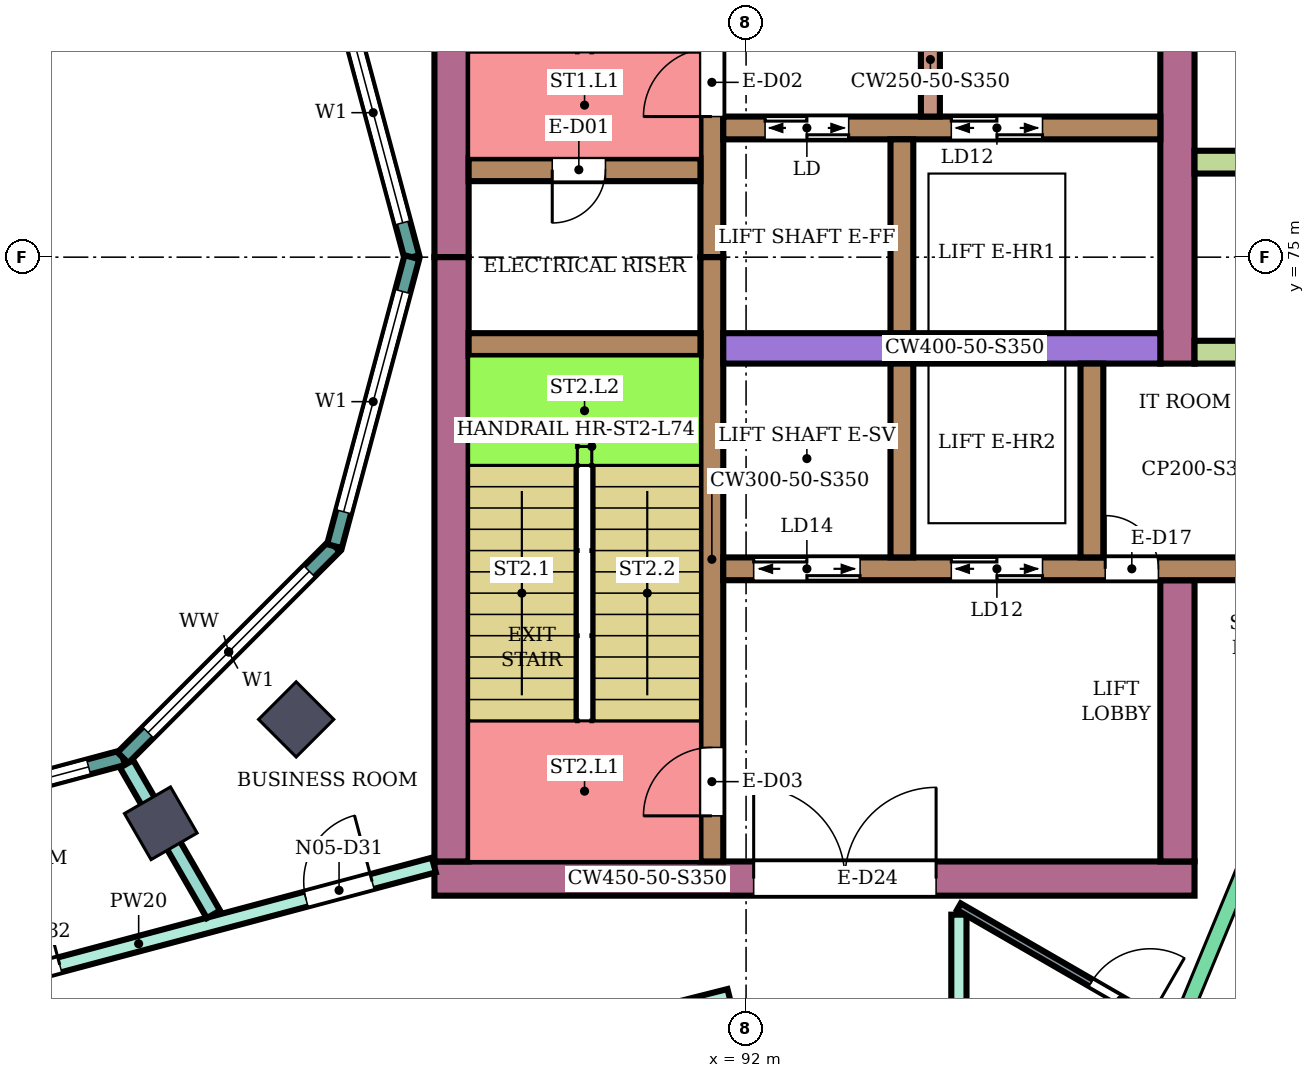
"""IFC4 building model, lengths in metres.
Left out: names, types, materials, properties, quantities, classifications, styles, units other than length and angle.
Written with IfcOpenShell. Run it as: python <this file> out.ifc"""

import sys

from ifc_helpers import new_model, si_unit, direction, frame, frame_2d, origin, origin_2d, place, context, subcontext, project, spatial, rectangle, extrude, element, fill, save


model = new_model("IFC4")
c1 = context("Model", 3, precision=1e-05, world=origin(), true_north=direction((0.0, 1.0)))
c2 = subcontext(c1, "Body", "Model", "MODEL_VIEW")
j1 = project(units=[si_unit("LENGTHUNIT", "METRE"), si_unit("PLANEANGLEUNIT", "RADIAN")], contexts=[c1])
p1 = place(None, origin())
s1 = spatial("IfcSite", under=j1, at=p1, CompositionType="ELEMENT")
p2 = place(p1, origin())
s2 = spatial("IfcBuilding", under=s1, at=p2, CompositionType="ELEMENT")
p3 = place(p2, frame((0.0, 0.0, 323.7)))
s3 = spatial("IfcBuildingStorey", under=s2, at=p3, CompositionType="ELEMENT", Elevation=323.7)
for number, where, z_axis, x_axis in (
    (1, (84.3, 67.552, 0.0), (0.0, 0.0, 1.0), (0.5, -0.866, 0.0)),
    (2, (86.081, 68.919, 0.0), (0.0, 0.0, 1.0), (0.707, -0.707, 0.0)),
):
    element("IfcColumn", number, at=place(p3, frame(where, z_axis=z_axis, x_axis=x_axis)), inside=s3, PredefinedType="COLUMN", context=c2, shape_type="SweptSolid", body=[
        extrude(rectangle(XDim=0.7, YDim=0.7, at=origin_2d()), origin(), (0.0, 0.0, 1.0), 4.4),
    ])
p4 = place(p3, frame((87.9, 66.825, 0.0), z_axis=(0.0, 0.0, 1.0), x_axis=(1.0, 0.0, 0.0)))
e3 = element("IfcWall", 3, at=p4, inside=s3, PredefinedType="SHEAR", context=c2, shape_type="SweptSolid", body=[
    extrude(rectangle(XDim=10.0, YDim=0.45, at=frame_2d((5.0, 0.0))), origin(), (0.0, 0.0, 1.0), 4.05),
])
p5 = place(p4, frame((4.2, 0.0, 0.0)))
e4 = element("IfcOpeningElement", 4, at=p5, cuts=e3, PredefinedType="OPENING", context=c2, shape_type="SweptSolid", body=[
    extrude(rectangle(XDim=2.4, YDim=2.4, at=frame_2d((1.2, 1.2))), frame((0.0, 0.235, 0.0), z_axis=(0.0, -1.0, 0.0), x_axis=(1.0, 0.0, 0.0)), (0.0, 0.0, 1.0), 0.47),
])
for number, where, z_axis, x_axis in (
    (5, (88.125, 75.0, 0.0), (0.0, 0.0, 1.0), (0.0, 1.0, 0.0)),
    (6, (88.125, 67.05, 0.0), (0.0, 0.0, 1.0), (0.0, 1.0, 0.0)),
):
    element("IfcWall", number, at=place(p3, frame(where, z_axis=z_axis, x_axis=x_axis)), inside=s3, PredefinedType="SHEAR", context=c2, shape_type="SweptSolid", body=[
        extrude(rectangle(XDim=7.95, YDim=0.45, at=frame_2d((3.975, 0.0))), origin(), (0.0, 0.0, 1.0), 4.05),
    ])
p6 = place(p3, frame((97.675, 73.6, 0.0), z_axis=(0.0, 0.0, 1.0), x_axis=(0.0, 1.0, 0.0)))
e7 = element("IfcWall", 7, at=p6, inside=s3, PredefinedType="SHEAR", context=c2, shape_type="SweptSolid", body=[
    extrude(rectangle(XDim=9.35, YDim=0.45, at=frame_2d((4.675, 0.0))), origin(), (0.0, 0.0, 1.0), 4.05),
])
p7 = place(p3, frame((97.675, 67.05, 0.0), z_axis=(0.0, 0.0, 1.0), x_axis=(0.0, 1.0, 0.0)))
e8 = element("IfcWall", 8, at=p7, inside=s3, PredefinedType="SHEAR", context=c2, shape_type="SweptSolid", body=[
    extrude(rectangle(XDim=3.7, YDim=0.45, at=frame_2d((1.85, 0.0))), origin(), (0.0, 0.0, 1.0), 4.05),
])
p8 = place(p3, frame((91.55, 75.0, 0.0), z_axis=(0.0, 0.0, 1.0), x_axis=(0.0, 1.0, 0.0)))
e9 = element("IfcWall", 9, at=p8, inside=s3, PredefinedType="SHEAR", context=c2, shape_type="SweptSolid", body=[
    extrude(rectangle(XDim=7.95, YDim=0.3, at=frame_2d((3.975, 0.0))), origin(), (0.0, 0.0, 1.0), 4.05),
])
p9 = place(p8, frame((1.85, 0.0, 0.0)))
e10 = element("IfcOpeningElement", 10, at=p9, cuts=e9, PredefinedType="OPENING", context=c2, shape_type="SweptSolid", body=[
    extrude(rectangle(XDim=0.9, YDim=2.1, at=frame_2d((0.45, 1.05))), frame((0.0, 0.16, 0.0), z_axis=(0.0, -1.0, 0.0), x_axis=(1.0, 0.0, 0.0)), (0.0, 0.0, 1.0), 0.32),
])
p10 = place(p3, frame((91.55, 67.05, 0.0), z_axis=(0.0, 0.0, 1.0), x_axis=(0.0, 1.0, 0.0)))
e11 = element("IfcWall", 11, at=p10, inside=s3, PredefinedType="SHEAR", context=c2, shape_type="SweptSolid", body=[
    extrude(rectangle(XDim=7.95, YDim=0.3, at=frame_2d((3.975, 0.0))), origin(), (0.0, 0.0, 1.0), 4.05),
])
p11 = place(p10, frame((0.6, 0.0, 0.0)))
e12 = element("IfcOpeningElement", 12, at=p11, cuts=e11, PredefinedType="OPENING", context=c2, shape_type="SweptSolid", body=[
    extrude(rectangle(XDim=0.9, YDim=2.1, at=frame_2d((0.45, 1.05))), frame((0.0, 0.16, 0.0), z_axis=(0.0, -1.0, 0.0), x_axis=(1.0, 0.0, 0.0)), (0.0, 0.0, 1.0), 0.32),
])
p12 = place(p3, frame((88.35, 76.15, 0.0), z_axis=(0.0, 0.0, 1.0), x_axis=(1.0, 0.0, 0.0)))
e13 = element("IfcWall", 13, at=p12, inside=s3, PredefinedType="SHEAR", context=c2, shape_type="SweptSolid", body=[
    extrude(rectangle(XDim=3.05, YDim=0.3, at=frame_2d((1.525, 0.0))), origin(), (0.0, 0.0, 1.0), 4.05),
])
p13 = place(p12, frame((1.1, 0.0, 0.0)))
e14 = element("IfcOpeningElement", 14, at=p13, cuts=e13, PredefinedType="OPENING", context=c2, shape_type="SweptSolid", body=[
    extrude(rectangle(XDim=0.7, YDim=2.0, at=frame_2d((0.35, 1.0))), frame((0.0, 0.16, 0.0), z_axis=(0.0, -1.0, 0.0), x_axis=(1.0, 0.0, 0.0)), (0.0, 0.0, 1.0), 0.32),
])
p14 = place(p3, frame((88.35, 73.85, 0.0), z_axis=(0.0, 0.0, 1.0), x_axis=(1.0, 0.0, 0.0)))
e15 = element("IfcWall", 15, at=p14, inside=s3, PredefinedType="SHEAR", context=c2, shape_type="SweptSolid", body=[
    extrude(rectangle(XDim=3.05, YDim=0.3, at=frame_2d((1.525, 0.0))), origin(), (0.0, 0.0, 1.0), 4.05),
])
p15 = place(p3, frame((91.7, 76.7, 0.0), z_axis=(0.0, 0.0, 1.0), x_axis=(1.0, 0.0, 0.0)))
e16 = element("IfcWall", 16, at=p15, inside=s3, PredefinedType="SHEAR", context=c2, shape_type="SweptSolid", body=[
    extrude(rectangle(XDim=5.75, YDim=0.3, at=frame_2d((2.875, 0.0))), origin(), (0.0, 0.0, 1.0), 4.05),
])
p16 = place(p15, frame((0.55, 0.0, 0.0)))
e17 = element("IfcOpeningElement", 17, at=p16, cuts=e16, PredefinedType="OPENING", context=c2, shape_type="SweptSolid", body=[
    extrude(rectangle(XDim=1.1, YDim=2.1, at=frame_2d((0.55, 1.05))), frame((0.0, 0.16, 0.0), z_axis=(0.0, -1.0, 0.0), x_axis=(1.0, 0.0, 0.0)), (0.0, 0.0, 1.0), 0.32),
])
p17 = place(p15, frame((3.0, 0.0, 0.0)))
e18 = element("IfcOpeningElement", 18, at=p17, cuts=e16, PredefinedType="OPENING", context=c2, shape_type="SweptSolid", body=[
    extrude(rectangle(XDim=1.2, YDim=2.1, at=frame_2d((0.6, 1.05))), frame((0.0, 0.16, 0.0), z_axis=(0.0, -1.0, 0.0), x_axis=(1.0, 0.0, 0.0)), (0.0, 0.0, 1.0), 0.32),
])
p18 = place(p3, frame((91.7, 73.8, 0.0), z_axis=(0.0, 0.0, 1.0), x_axis=(1.0, 0.0, 0.0)))
e19 = element("IfcWall", 19, at=p18, inside=s3, PredefinedType="SHEAR", context=c2, shape_type="SweptSolid", body=[
    extrude(rectangle(XDim=5.75, YDim=0.4, at=frame_2d((2.875, 0.0))), origin(), (0.0, 0.0, 1.0), 4.05),
])
p19 = place(p3, frame((91.7, 70.9, 0.0), z_axis=(0.0, 0.0, 1.0), x_axis=(1.0, 0.0, 0.0)))
e20 = element("IfcWall", 20, at=p19, inside=s3, PredefinedType="SHEAR", context=c2, shape_type="SweptSolid", body=[
    extrude(rectangle(XDim=7.3, YDim=0.3, at=frame_2d((3.65, 0.0))), origin(), (0.0, 0.0, 1.0), 4.05),
])
p20 = place(p19, frame((0.4, 0.0, 0.0)))
e21 = element("IfcOpeningElement", 21, at=p20, cuts=e20, PredefinedType="OPENING", context=c2, shape_type="SweptSolid", body=[
    extrude(rectangle(XDim=1.4, YDim=2.1, at=frame_2d((0.7, 1.05))), frame((0.0, 0.16, 0.0), z_axis=(0.0, -1.0, 0.0), x_axis=(1.0, 0.0, 0.0)), (0.0, 0.0, 1.0), 0.32),
])
p21 = place(p19, frame((3.0, 0.0, 0.0)))
e22 = element("IfcOpeningElement", 22, at=p21, cuts=e20, PredefinedType="OPENING", context=c2, shape_type="SweptSolid", body=[
    extrude(rectangle(XDim=1.2, YDim=2.1, at=frame_2d((0.6, 1.05))), frame((0.0, 0.16, 0.0), z_axis=(0.0, -1.0, 0.0), x_axis=(1.0, 0.0, 0.0)), (0.0, 0.0, 1.0), 0.32),
])
p22 = place(p19, frame((5.025, 0.0, 0.0)))
e23 = element("IfcOpeningElement", 23, at=p22, cuts=e20, PredefinedType="OPENING", context=c2, shape_type="SweptSolid", body=[
    extrude(rectangle(XDim=0.7, YDim=2.1, at=frame_2d((0.35, 1.05))), frame((0.0, 0.16, 0.0), z_axis=(0.0, -1.0, 0.0), x_axis=(1.0, 0.0, 0.0)), (0.0, 0.0, 1.0), 0.32),
])
for number, where, z_axis, x_axis in (
    (24, (94.05, 74.0, 0.0), (0.0, 0.0, 1.0), (0.0, 1.0, 0.0)),
    (25, (94.05, 71.05, 0.0), (0.0, 0.0, 1.0), (0.0, 1.0, 0.0)),
    (26, (96.55, 71.05, 0.0), (0.0, 0.0, 1.0), (0.0, 1.0, 0.0)),
):
    element("IfcWall", number, at=place(p3, frame(where, z_axis=z_axis, x_axis=x_axis)), inside=s3, PredefinedType="SHEAR", context=c2, shape_type="SweptSolid", body=[
        extrude(rectangle(XDim=2.55, YDim=0.3, at=frame_2d((1.275, 0.0))), origin(), (0.0, 0.0, 1.0), 4.05),
    ])
p23 = place(p3, frame((94.425, 76.85, 0.0), z_axis=(0.0, 0.0, 1.0), x_axis=(0.0, 1.0, 0.0)))
e27 = element("IfcWall", 27, at=p23, inside=s3, PredefinedType="SHEAR", context=c2, shape_type="SweptSolid", body=[
    extrude(rectangle(XDim=1.5, YDim=0.25, at=frame_2d((0.75, 0.0))), origin(), (0.0, 0.0, 1.0), 4.05),
])
for number, where, z_axis, x_axis in (
    (28, (97.9, 73.75, 0.0), (0.0, 0.0, 1.0), (1.0, 0.0, 0.0)),
    (29, (97.9, 76.25, 0.0), (0.0, 0.0, 1.0), (1.0, 0.0, 0.0)),
):
    element("IfcWall", number, at=place(p3, frame(where, z_axis=z_axis, x_axis=x_axis)), inside=s3, PredefinedType="NOTDEFINED", context=c2, shape_type="SweptSolid", body=[
        extrude(rectangle(XDim=2.416, YDim=0.3, at=frame_2d((1.208, 0.0))), origin(), (0.0, 0.0, 1.0), 4.4),
    ])
p24 = place(p3, frame((87.604, 75.0, 0.0), z_axis=(0.0, 0.0, 1.0), x_axis=(-0.258789828301, 0.965933654434, 0.0)))
e30 = element("IfcWall", 30, at=p24, inside=s3, PredefinedType="NOTDEFINED", context=c2, shape_type="SweptSolid", body=[
    extrude(rectangle(XDim=3.936, YDim=0.2, at=frame_2d((1.968, 0.0))), origin(), (0.0, 0.0, 1.0), 4.4),
])
p25 = place(p24, frame((0.468, 0.0, 0.9)))
e31 = element("IfcOpeningElement", 31, at=p25, cuts=e30, PredefinedType="OPENING", context=c2, shape_type="SweptSolid", body=[
    extrude(rectangle(XDim=3.0, YDim=2.3, at=frame_2d((1.5, 1.15))), frame((0.0, 0.11, 0.0), z_axis=(0.0, -1.0, 0.0), x_axis=(1.0, 0.0, 0.0)), (0.0, 0.0, 1.0), 0.22),
])
p26 = place(p3, frame((80.0, 67.396, 0.0), z_axis=(0.0, 0.0, 1.0), x_axis=(0.965933654434, 0.258789828301, 0.0)))
e32 = element("IfcWall", 32, at=p26, inside=s3, PredefinedType="NOTDEFINED", context=c2, shape_type="SweptSolid", body=[
    extrude(rectangle(XDim=3.936, YDim=0.2, at=frame_2d((1.968, 0.0))), origin(), (0.0, 0.0, 1.0), 4.4),
])
p27 = place(p26, frame((0.468, 0.0, 0.9)))
e33 = element("IfcOpeningElement", 33, at=p27, cuts=e32, PredefinedType="OPENING", context=c2, shape_type="SweptSolid", body=[
    extrude(rectangle(XDim=3.0, YDim=2.3, at=frame_2d((1.5, 1.15))), frame((0.0, 0.11, 0.0), z_axis=(0.0, -1.0, 0.0), x_axis=(1.0, 0.0, 0.0)), (0.0, 0.0, 1.0), 0.22),
])
p28 = place(p3, frame((83.802, 68.415, 0.0), z_axis=(0.0, 0.0, 1.0), x_axis=(0.707106781187, 0.707106781187, 0.0)))
e34 = element("IfcWall", 34, at=p28, inside=s3, PredefinedType="NOTDEFINED", context=c2, shape_type="SweptSolid", body=[
    extrude(rectangle(XDim=3.936, YDim=0.2, at=frame_2d((1.968, 0.0))), origin(), (0.0, 0.0, 1.0), 4.4),
])
p29 = place(p28, frame((0.468, 0.0, 0.9)))
e35 = element("IfcOpeningElement", 35, at=p29, cuts=e34, PredefinedType="OPENING", context=c2, shape_type="SweptSolid", body=[
    extrude(rectangle(XDim=3.0, YDim=2.3, at=frame_2d((1.5, 1.15))), frame((0.0, 0.11, 0.0), z_axis=(0.0, -1.0, 0.0), x_axis=(1.0, 0.0, 0.0)), (0.0, 0.0, 1.0), 0.22),
])
p30 = place(p3, frame((86.585, 71.198, 0.0), z_axis=(0.0, 0.0, 1.0), x_axis=(0.258789828301, 0.965933654434, 0.0)))
e36 = element("IfcWall", 36, at=p30, inside=s3, PredefinedType="NOTDEFINED", context=c2, shape_type="SweptSolid", body=[
    extrude(rectangle(XDim=3.936, YDim=0.2, at=frame_2d((1.968, 0.0))), origin(), (0.0, 0.0, 1.0), 4.4),
])
p31 = place(p30, frame((0.468, 0.0, 0.9)))
e37 = element("IfcOpeningElement", 37, at=p31, cuts=e36, PredefinedType="OPENING", context=c2, shape_type="SweptSolid", body=[
    extrude(rectangle(XDim=3.0, YDim=2.3, at=frame_2d((1.5, 1.15))), frame((0.0, 0.11, 0.0), z_axis=(0.0, -1.0, 0.0), x_axis=(1.0, 0.0, 0.0)), (0.0, 0.0, 1.0), 0.22),
])
p32 = place(p3, frame((80.125, 64.932, 0.0), z_axis=(0.0, 0.0, 1.0), x_axis=(0.966236955806, 0.257655089674, 0.0)))
e38 = element("IfcWall", 38, at=p32, inside=s3, PredefinedType="PARTITIONING", context=c2, shape_type="SweptSolid", body=[
    extrude(rectangle(XDim=8.039, YDim=0.2, at=frame_2d((4.02, 0.0))), origin(), (0.0, 0.0, 1.0), 3.95),
])
p33 = place(p32, frame((6.298, 0.0, 0.0)))
e39 = element("IfcOpeningElement", 39, at=p33, cuts=e38, PredefinedType="OPENING", context=c2, shape_type="SweptSolid", body=[
    extrude(rectangle(XDim=0.9, YDim=2.1, at=frame_2d((0.45, 1.05))), frame((0.0, 0.11, 0.0), z_axis=(0.0, -1.0, 0.0), x_axis=(1.0, 0.0, 0.0)), (0.0, 0.0, 1.0), 0.22),
])
p34 = place(p32, frame((2.045, 0.0, 0.0)))
e40 = element("IfcOpeningElement", 40, at=p34, cuts=e38, PredefinedType="OPENING", context=c2, shape_type="SweptSolid", body=[
    extrude(rectangle(XDim=0.9, YDim=2.1, at=frame_2d((0.45, 1.05))), frame((0.0, 0.11, 0.0), z_axis=(0.0, -1.0, 0.0), x_axis=(1.0, 0.0, 0.0)), (0.0, 0.0, 1.0), 0.22),
])
p35 = place(p3, frame((83.85, 68.333, 0.0), z_axis=(0.0, 0.0, 1.0), x_axis=(0.500080019051, -0.865979199835, 0.0)))
e41 = element("IfcWall", 41, at=p35, inside=s3, PredefinedType="PARTITIONING", context=c2, shape_type="SweptSolid", body=[
    extrude(rectangle(XDim=2.285, YDim=0.2, at=frame_2d((1.143, 0.0))), origin(), (0.0, 0.0, 1.0), 2.45),
])
p36 = place(p3, frame((86.053, 63.826, 0.0), z_axis=(0.0, 0.0, 1.0), x_axis=(0.969480070232, 0.245170131586, 0.0)))
e42 = element("IfcWall", 42, at=p36, inside=s3, PredefinedType="PARTITIONING", context=c2, shape_type="SweptSolid", body=[
    extrude(rectangle(XDim=5.907, YDim=0.2, at=frame_2d((2.954, 0.0))), origin(), (0.0, 0.0, 1.0), 3.95),
])
p37 = place(p36, frame((0.889, 0.0, 0.0)))
e43 = element("IfcOpeningElement", 43, at=p37, cuts=e42, PredefinedType="OPENING", context=c2, shape_type="SweptSolid", body=[
    extrude(rectangle(XDim=1.0, YDim=2.1, at=frame_2d((0.5, 1.05))), frame((0.0, 0.11, 0.0), z_axis=(0.0, -1.0, 0.0), x_axis=(1.0, 0.0, 0.0)), (0.0, 0.0, 1.0), 0.22),
])
p38 = place(p3, frame((94.8, 65.1, 0.0), z_axis=(0.0, 0.0, 1.0), x_axis=(0.0, 1.0, 0.0)))
e44 = element("IfcWall", 44, at=p38, inside=s3, PredefinedType="PARTITIONING", context=c2, shape_type="SweptSolid", body=[
    extrude(rectangle(XDim=1.25, YDim=0.2, at=frame_2d((0.625, 0.0))), origin(), (0.0, 0.0, 1.0), 3.95),
])
p39 = place(p3, frame((94.8, 66.455, 0.0), z_axis=(0.0, 0.0, 1.0), x_axis=(0.866056279496, -0.499946517884, 0.0)))
e45 = element("IfcWall", 45, at=p39, inside=s3, PredefinedType="PARTITIONING", context=c2, shape_type="SweptSolid", body=[
    extrude(rectangle(XDim=3.207, YDim=0.1, at=frame_2d((1.604, 0.0))), origin(), (0.0, 0.0, 1.0), 3.95),
])
p40 = place(p39, frame((2.007, 0.0, 0.0)))
e46 = element("IfcOpeningElement", 46, at=p40, cuts=e45, PredefinedType="OPENING", context=c2, shape_type="SweptSolid", body=[
    extrude(rectangle(XDim=0.9, YDim=2.1, at=frame_2d((0.45, 1.05))), frame((0.0, 0.06, 0.0), z_axis=(0.0, -1.0, 0.0), x_axis=(1.0, 0.0, 0.0)), (0.0, 0.0, 1.0), 0.12),
])
p41 = place(p25, origin())
e47 = element("IfcWindow", 47, at=p41, inside=s3, PartitioningType="SINGLE_PANEL", PredefinedType="WINDOW", context=c2, shape_type="SweptSolid", body=[
    extrude(rectangle(XDim=3.0, YDim=2.3, at=frame_2d((1.5, 1.15))), frame((0.0, 0.03, 0.0), z_axis=(0.0, -1.0, 0.0), x_axis=(1.0, 0.0, 0.0)), (0.0, 0.0, 1.0), 0.06),
])
fill(e31, e47)
p42 = place(p27, origin())
e48 = element("IfcWindow", 48, at=p42, inside=s3, PartitioningType="SINGLE_PANEL", PredefinedType="WINDOW", context=c2, shape_type="SweptSolid", body=[
    extrude(rectangle(XDim=3.0, YDim=2.3, at=frame_2d((1.5, 1.15))), frame((0.0, 0.03, 0.0), z_axis=(0.0, -1.0, 0.0), x_axis=(1.0, 0.0, 0.0)), (0.0, 0.0, 1.0), 0.06),
])
fill(e33, e48)
p43 = place(p29, origin())
e49 = element("IfcWindow", 49, at=p43, inside=s3, PartitioningType="SINGLE_PANEL", PredefinedType="WINDOW", context=c2, shape_type="SweptSolid", body=[
    extrude(rectangle(XDim=3.0, YDim=2.3, at=frame_2d((1.5, 1.15))), frame((0.0, 0.03, 0.0), z_axis=(0.0, -1.0, 0.0), x_axis=(1.0, 0.0, 0.0)), (0.0, 0.0, 1.0), 0.06),
])
fill(e35, e49)
p44 = place(p31, origin())
e50 = element("IfcWindow", 50, at=p44, inside=s3, PartitioningType="SINGLE_PANEL", PredefinedType="WINDOW", context=c2, shape_type="SweptSolid", body=[
    extrude(rectangle(XDim=3.0, YDim=2.3, at=frame_2d((1.5, 1.15))), frame((0.0, 0.03, 0.0), z_axis=(0.0, -1.0, 0.0), x_axis=(1.0, 0.0, 0.0)), (0.0, 0.0, 1.0), 0.06),
])
fill(e37, e50)
p45 = place(p40, origin())
e51 = element("IfcDoor", 51, at=p45, inside=s3, OperationType="SINGLE_SWING_RIGHT", PredefinedType="DOOR", context=c2, shape_type="SweptSolid", body=[
    extrude(rectangle(XDim=0.9, YDim=2.1, at=frame_2d((0.45, 1.05))), frame((0.0, 0.025, 0.0), z_axis=(0.0, -1.0, 0.0), x_axis=(1.0, 0.0, 0.0)), (0.0, 0.0, 1.0), 0.05),
])
fill(e46, e51)
p46 = place(p33, origin())
e52 = element("IfcDoor", 52, at=p46, inside=s3, OperationType="SINGLE_SWING_RIGHT", PredefinedType="DOOR", context=c2, shape_type="SweptSolid", body=[
    extrude(rectangle(XDim=0.9, YDim=2.1, at=frame_2d((0.45, 1.05))), frame((0.0, 0.025, 0.0), z_axis=(0.0, -1.0, 0.0), x_axis=(1.0, 0.0, 0.0)), (0.0, 0.0, 1.0), 0.05),
])
fill(e39, e52)
p47 = place(p34, origin())
e53 = element("IfcDoor", 53, at=p47, inside=s3, OperationType="SINGLE_SWING_RIGHT", PredefinedType="DOOR", context=c2, shape_type="SweptSolid", body=[
    extrude(rectangle(XDim=0.9, YDim=2.1, at=frame_2d((0.45, 1.05))), frame((0.0, 0.025, 0.0), z_axis=(0.0, -1.0, 0.0), x_axis=(1.0, 0.0, 0.0)), (0.0, 0.0, 1.0), 0.05),
])
fill(e40, e53)
p48 = place(p13, frame((0.7, 0.0, 0.0), z_axis=(0.0, 0.0, 1.0), x_axis=(-1.0, 0.0, 0.0)))
e54 = element("IfcDoor", 54, at=p48, inside=s3, OperationType="SINGLE_SWING_RIGHT", PredefinedType="DOOR", context=c2, shape_type="SweptSolid", body=[
    extrude(rectangle(XDim=0.7, YDim=2.0, at=frame_2d((0.35, 1.0))), frame((0.0, 0.025, 0.0), z_axis=(0.0, -1.0, 0.0), x_axis=(1.0, 0.0, 0.0)), (0.0, 0.0, 1.0), 0.05),
])
fill(e14, e54)
p49 = place(p9, origin())
e55 = element("IfcDoor", 55, at=p49, inside=s3, OperationType="SINGLE_SWING_LEFT", PredefinedType="DOOR", context=c2, shape_type="SweptSolid", body=[
    extrude(rectangle(XDim=0.9, YDim=2.1, at=frame_2d((0.45, 1.05))), frame((0.0, 0.025, 0.0), z_axis=(0.0, -1.0, 0.0), x_axis=(1.0, 0.0, 0.0)), (0.0, 0.0, 1.0), 0.05),
])
fill(e10, e55)
p50 = place(p11, origin())
e56 = element("IfcDoor", 56, at=p50, inside=s3, OperationType="SINGLE_SWING_LEFT", PredefinedType="DOOR", context=c2, shape_type="SweptSolid", body=[
    extrude(rectangle(XDim=0.9, YDim=2.1, at=frame_2d((0.45, 1.05))), frame((0.0, 0.025, 0.0), z_axis=(0.0, -1.0, 0.0), x_axis=(1.0, 0.0, 0.0)), (0.0, 0.0, 1.0), 0.05),
])
fill(e12, e56)
p51 = place(p16, origin())
e57 = element("IfcDoor", 57, at=p51, inside=s3, OperationType="DOUBLE_DOOR_SLIDING", PredefinedType="DOOR", context=c2, shape_type="SweptSolid", body=[
    extrude(rectangle(XDim=1.1, YDim=2.1, at=frame_2d((0.55, 1.05))), frame((0.0, 0.025, 0.0), z_axis=(0.0, -1.0, 0.0), x_axis=(1.0, 0.0, 0.0)), (0.0, 0.0, 1.0), 0.05),
])
fill(e17, e57)
p52 = place(p17, origin())
e58 = element("IfcDoor", 58, at=p52, inside=s3, OperationType="DOUBLE_DOOR_SLIDING", PredefinedType="DOOR", context=c2, shape_type="SweptSolid", body=[
    extrude(rectangle(XDim=1.2, YDim=2.1, at=frame_2d((0.6, 1.05))), frame((0.0, 0.025, 0.0), z_axis=(0.0, -1.0, 0.0), x_axis=(1.0, 0.0, 0.0)), (0.0, 0.0, 1.0), 0.05),
])
fill(e18, e58)
p53 = place(p20, origin())
e59 = element("IfcDoor", 59, at=p53, inside=s3, OperationType="DOUBLE_DOOR_SLIDING", PredefinedType="DOOR", context=c2, shape_type="SweptSolid", body=[
    extrude(rectangle(XDim=1.4, YDim=2.1, at=frame_2d((0.7, 1.05))), frame((0.0, 0.025, 0.0), z_axis=(0.0, -1.0, 0.0), x_axis=(1.0, 0.0, 0.0)), (0.0, 0.0, 1.0), 0.05),
])
fill(e21, e59)
p54 = place(p21, origin())
e60 = element("IfcDoor", 60, at=p54, inside=s3, OperationType="DOUBLE_DOOR_SLIDING", PredefinedType="DOOR", context=c2, shape_type="SweptSolid", body=[
    extrude(rectangle(XDim=1.2, YDim=2.1, at=frame_2d((0.6, 1.05))), frame((0.0, 0.025, 0.0), z_axis=(0.0, -1.0, 0.0), x_axis=(1.0, 0.0, 0.0)), (0.0, 0.0, 1.0), 0.05),
])
fill(e22, e60)
p55 = place(p22, origin())
e61 = element("IfcDoor", 61, at=p55, inside=s3, OperationType="SINGLE_SWING_LEFT", PredefinedType="DOOR", context=c2, shape_type="SweptSolid", body=[
    extrude(rectangle(XDim=0.7, YDim=2.1, at=frame_2d((0.35, 1.05))), frame((0.0, 0.025, 0.0), z_axis=(0.0, -1.0, 0.0), x_axis=(1.0, 0.0, 0.0)), (0.0, 0.0, 1.0), 0.05),
])
fill(e23, e61)
p56 = place(p5, origin())
e62 = element("IfcDoor", 62, at=p56, inside=s3, OperationType="DOUBLE_DOOR_SINGLE_SWING", PredefinedType="DOOR", context=c2, shape_type="SweptSolid", body=[
    extrude(rectangle(XDim=2.4, YDim=2.4, at=frame_2d((1.2, 1.2))), frame((0.0, 0.025, 0.0), z_axis=(0.0, -1.0, 0.0), x_axis=(1.0, 0.0, 0.0)), (0.0, 0.0, 1.0), 0.05),
])
fill(e4, e62)
save(model, sys.argv[1])
